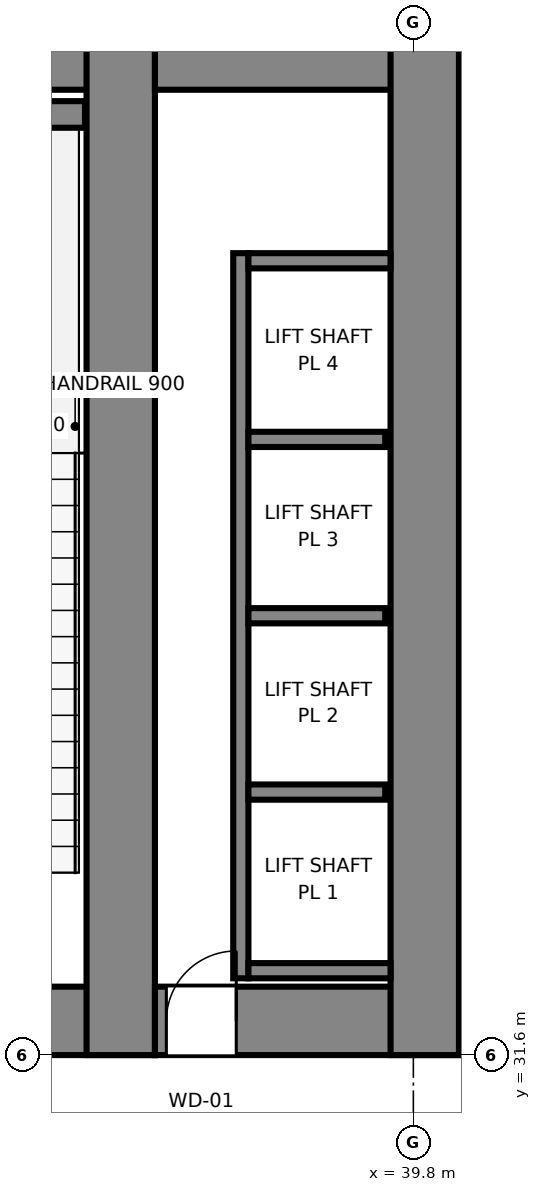
"""IFC4 building model, lengths in metres.
Left out: names, types, materials, properties, quantities, classifications, styles, units other than length and angle.
Written with IfcOpenShell. Run it as: python <this file> out.ifc"""

import sys

from ifc_helpers import new_model, si_unit, direction, frame, frame_2d, origin, place, context, subcontext, project, spatial, rectangle, extrude, source, transform, mapped, element, fill, save


model = new_model("IFC4")
c1 = context("Model", 3, precision=1e-05, world=origin(), true_north=direction((0.0, 1.0)))
c2 = subcontext(c1, "Body", "Model", "MODEL_VIEW")
j1 = project(units=[si_unit("LENGTHUNIT", "METRE"), si_unit("PLANEANGLEUNIT", "RADIAN")], contexts=[c1])
p1 = place(None, origin())
s1 = spatial("IfcSite", under=j1, at=p1, CompositionType="ELEMENT")
p2 = place(p1, origin())
s2 = spatial("IfcBuilding", under=s1, at=p2, CompositionType="ELEMENT")
p3 = place(p2, frame((0.0, 0.0, 16.0)))
s3 = spatial("IfcBuildingStorey", under=s2, at=p3, CompositionType="ELEMENT", Elevation=16.0)
p4 = place(p3, frame((9.6, 32.05, 0.0), z_axis=(0.0, 0.0, 1.0), x_axis=(1.0, 0.0, 0.0)))
e1 = element("IfcWall", 1, at=p4, inside=s3, PredefinedType="SHEAR", context=c2, shape_type="SweptSolid", body=[
    extrude(rectangle(XDim=26.8, YDim=0.9, at=frame_2d((13.4, 0.0))), origin(), (0.0, 0.0, 1.0), 6.4),
])
p5 = place(p4, frame((7.85, 0.0, 0.0), z_axis=(0.0, 0.0, 1.0), x_axis=(-1.0, 0.0, 0.0)))
e2 = element("IfcOpeningElement", 2, at=p5, cuts=e1, PredefinedType="OPENING", context=c2, shape_type="SweptSolid", body=[
    extrude(rectangle(XDim=1.5, YDim=2.04, at=frame_2d((0.75, 1.02))), frame((0.0, 0.46, 0.0), z_axis=(0.0, -1.0, 0.0), x_axis=(1.0, 0.0, 0.0)), (0.0, 0.0, 1.0), 0.92),
])
p6 = place(p4, frame((14.15, 0.0, 0.0), z_axis=(0.0, 0.0, 1.0), x_axis=(-1.0, 0.0, 0.0)))
e3 = element("IfcOpeningElement", 3, at=p6, cuts=e1, PredefinedType="OPENING", context=c2, shape_type="SweptSolid", body=[
    extrude(rectangle(XDim=1.5, YDim=2.04, at=frame_2d((0.75, 1.02))), frame((0.0, 0.46, 0.0), z_axis=(0.0, -1.0, 0.0), x_axis=(1.0, 0.0, 0.0)), (0.0, 0.0, 1.0), 0.92),
])
p7 = place(p4, frame((20.45, 0.0, 0.0), z_axis=(0.0, 0.0, 1.0), x_axis=(-1.0, 0.0, 0.0)))
e4 = element("IfcOpeningElement", 4, at=p7, cuts=e1, PredefinedType="OPENING", context=c2, shape_type="SweptSolid", body=[
    extrude(rectangle(XDim=1.5, YDim=2.04, at=frame_2d((0.75, 1.02))), frame((0.0, 0.46, 0.0), z_axis=(0.0, -1.0, 0.0), x_axis=(1.0, 0.0, 0.0)), (0.0, 0.0, 1.0), 0.92),
])
p8 = place(p3, frame((9.6, 44.75, 0.0), z_axis=(0.0, 0.0, 1.0), x_axis=(1.0, 0.0, 0.0)))
e5 = element("IfcWall", 5, at=p8, inside=s3, PredefinedType="SHEAR", context=c2, shape_type="SweptSolid", body=[
    extrude(rectangle(XDim=26.8, YDim=0.9, at=frame_2d((13.4, 0.0))), origin(), (0.0, 0.0, 1.0), 6.4),
])
p9 = place(p3, frame((35.95, 31.6, 0.0), z_axis=(0.0, 0.0, 1.0), x_axis=(0.0, 1.0, 0.0)))
e6 = element("IfcWall", 6, at=p9, inside=s3, PredefinedType="SHEAR", context=c2, shape_type="SweptSolid", body=[
    extrude(rectangle(XDim=13.6, YDim=0.9, at=frame_2d((6.8, 0.0))), origin(), (0.0, 0.0, 1.0), 6.4),
])
p10 = place(p3, frame((36.4, 32.05, 0.0), z_axis=(0.0, 0.0, 1.0), x_axis=(1.0, 0.0, 0.0)))
e7 = element("IfcWall", 7, at=p10, inside=s3, PredefinedType="SHEAR", context=c2, shape_type="SweptSolid", body=[
    extrude(rectangle(XDim=4.0, YDim=0.9, at=frame_2d((2.0, 0.0))), origin(), (0.0, 0.0, 1.0), 6.4),
])
p11 = place(p10, frame((1.07, 0.0, 0.0), z_axis=(0.0, 0.0, 1.0), x_axis=(-1.0, 0.0, 0.0)))
e8 = element("IfcOpeningElement", 8, at=p11, cuts=e7, PredefinedType="OPENING", context=c2, shape_type="SweptSolid", body=[
    extrude(rectangle(XDim=0.92, YDim=2.01, at=frame_2d((0.46, 1.005))), frame((0.0, 0.46, 0.0), z_axis=(0.0, -1.0, 0.0), x_axis=(1.0, 0.0, 0.0)), (0.0, 0.0, 1.0), 0.92),
])
p12 = place(p3, frame((36.4, 44.75, 0.0), z_axis=(0.0, 0.0, 1.0), x_axis=(1.0, 0.0, 0.0)))
e9 = element("IfcWall", 9, at=p12, inside=s3, PredefinedType="SHEAR", context=c2, shape_type="SweptSolid", body=[
    extrude(rectangle(XDim=4.0, YDim=0.9, at=frame_2d((2.0, 0.0))), origin(), (0.0, 0.0, 1.0), 6.4),
])
p13 = place(p3, frame((39.95, 31.6, 0.0), z_axis=(0.0, 0.0, 1.0), x_axis=(0.0, 1.0, 0.0)))
e10 = element("IfcWall", 10, at=p13, inside=s3, PredefinedType="SHEAR", context=c2, shape_type="SweptSolid", body=[
    extrude(rectangle(XDim=13.6, YDim=0.9, at=frame_2d((6.8, 0.0))), origin(), (0.0, 0.0, 1.0), 6.4),
])
p14 = place(p3, frame((31.88, 43.975, 0.0), z_axis=(0.0, 0.0, 1.0), x_axis=(1.0, 0.0, 0.0)))
e11 = element("IfcWall", 11, at=p14, inside=s3, PredefinedType="SHEAR", context=c2, shape_type="SweptSolid", body=[
    extrude(rectangle(XDim=3.6, YDim=0.35, at=frame_2d((1.8, 0.0))), origin(), (0.0, 0.0, 1.0), 6.4),
])
p15 = place(p3, frame((37.53, 32.61, 0.0), z_axis=(0.0, 0.0, 1.0), x_axis=(0.0, 1.0, 0.0)))
e12 = element("IfcWall", 12, at=p15, inside=s3, PredefinedType="SOLIDWALL", context=c2, shape_type="SweptSolid", body=[
    extrude(rectangle(XDim=9.54, YDim=0.2, at=frame_2d((4.77, 0.0))), origin(), (0.0, 0.0, 1.0), 6.14),
])
for number, where, z_axis, x_axis in (
    (13, (37.63, 32.71, 0.0), (0.0, 0.0, 1.0), (1.0, 0.0, 0.0)),
    (14, (37.63, 42.05, 0.0), (0.0, 0.0, 1.0), (1.0, 0.0, 0.0)),
):
    element("IfcWall", number, at=place(p3, frame(where, z_axis=z_axis, x_axis=x_axis)), inside=s3, PredefinedType="SOLIDWALL", context=c2, shape_type="SweptSolid", body=[
        extrude(rectangle(XDim=1.87, YDim=0.2, at=frame_2d((0.935, 0.0))), origin(), (0.0, 0.0, 1.0), 6.14),
    ])
for number, where, z_axis, x_axis in (
    (15, (37.63, 35.06, 0.0), (0.0, 0.0, 1.0), (1.0, 0.0, 0.0)),
    (16, (37.63, 37.38, 0.0), (0.0, 0.0, 1.0), (1.0, 0.0, 0.0)),
    (17, (37.63, 39.7, 0.0), (0.0, 0.0, 1.0), (1.0, 0.0, 0.0)),
):
    element("IfcWall", number, at=place(p3, frame(where, z_axis=z_axis, x_axis=x_axis)), inside=s3, PredefinedType="SOLIDWALL", context=c2, shape_type="SweptSolid", body=[
        extrude(rectangle(XDim=1.8, YDim=0.2, at=frame_2d((0.9, 0.0))), origin(), (0.0, 0.0, 1.0), 6.14),
    ])
m1 = source(origin(), c2, "Body", "SweptSolid", [
    extrude(rectangle(XDim=0.92, YDim=2.01, at=frame_2d((0.46, 1.005))), frame((0.0, 0.025, 0.0), z_axis=(0.0, -1.0, 0.0), x_axis=(1.0, 0.0, 0.0)), (0.0, 0.0, 1.0), 0.05),
])
p16 = place(p11, origin())
e18 = element("IfcDoor", 18, at=p16, inside=s3, OperationType="SINGLE_SWING_RIGHT", PredefinedType="DOOR", context=c2, shape_type="MappedRepresentation", body=[
    mapped(m1, transform((0.0, 0.0, 0.0), x_axis=(1.0, 0.0, 0.0), y_axis=(0.0, 1.0, 0.0), z_axis=(0.0, 0.0, 1.0), scale=1.0)),
])
fill(e8, e18)
save(model, sys.argv[1])
